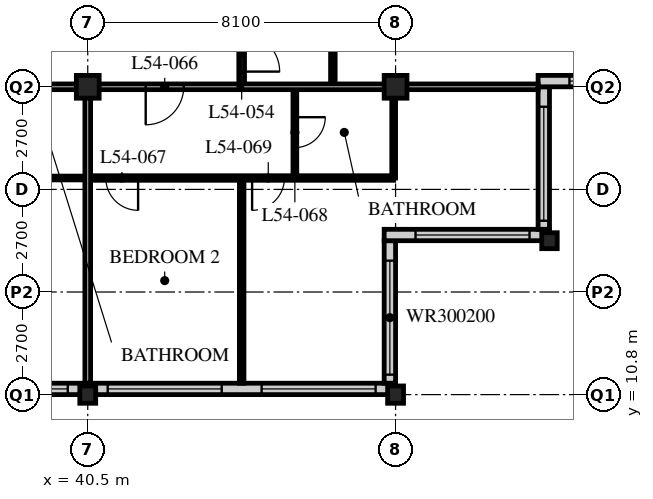
"""IFC4 building model, lengths in metres.
Left out: names, types, materials, properties, quantities, classifications, styles, units other than length and angle.
Written with IfcOpenShell. Run it as: python <this file> out.ifc"""

import sys

from ifc_helpers import new_model, si_unit, direction, frame, frame_2d, origin, origin_2d, place, context, subcontext, project, spatial, rectangle, hollow_rectangle, i_section, extrude, element, fill, save


model = new_model("IFC4")
c1 = context("Model", 3, precision=1e-05, world=origin(), true_north=direction((0.0, 1.0)))
c2 = subcontext(c1, "Body", "Model", "MODEL_VIEW")
j1 = project(units=[si_unit("LENGTHUNIT", "METRE"), si_unit("PLANEANGLEUNIT", "RADIAN")], contexts=[c1])
p1 = place(None, origin())
s1 = spatial("IfcSite", under=j1, at=p1, CompositionType="ELEMENT")
p2 = place(p1, origin())
s2 = spatial("IfcBuilding", under=s1, at=p2, CompositionType="ELEMENT")
p3 = place(p2, frame((0.0, 0.0, 210.0)))
s3 = spatial("IfcBuildingStorey", under=s2, at=p3, CompositionType="ELEMENT", Elevation=210.0)
p4 = place(p3, frame((40.5, 10.8, 0.0), z_axis=(0.0, 0.0, 1.0), x_axis=(1.0, 0.0, 0.0)))
e1 = element("IfcColumn", 1, at=p4, inside=s3, PredefinedType="COLUMN", context=c2, shape_type="SweptSolid", body=[
    extrude(i_section(OverallWidth=0.418, OverallDepth=0.456, WebThickness=0.042, FlangeThickness=0.067, FilletRadius=0.015, at=origin_2d()), origin(), (0.0, 0.0, 1.0), 3.6),
])
p5 = place(p3, frame((40.5, 18.9, 0.0), z_axis=(0.0, 0.0, 1.0), x_axis=(1.0, 0.0, 0.0)))
e2 = element("IfcColumn", 2, at=p5, inside=s3, PredefinedType="COLUMN", context=c2, shape_type="SweptSolid", body=[
    extrude(hollow_rectangle(XDim=0.6, YDim=0.6, WallThickness=0.05, at=origin_2d()), origin(), (0.0, 0.0, 1.0), 3.6),
])
p6 = place(p3, frame((48.6, 10.8, 0.0), z_axis=(0.0, 0.0, 1.0), x_axis=(1.0, 0.0, 0.0)))
e3 = element("IfcColumn", 3, at=p6, inside=s3, PredefinedType="COLUMN", context=c2, shape_type="SweptSolid", body=[
    extrude(i_section(OverallWidth=0.418, OverallDepth=0.456, WebThickness=0.042, FlangeThickness=0.067, FilletRadius=0.015, at=origin_2d()), origin(), (0.0, 0.0, 1.0), 3.6),
])
p7 = place(p3, frame((48.6, 18.9, 0.0), z_axis=(0.0, 0.0, 1.0), x_axis=(1.0, 0.0, 0.0)))
e4 = element("IfcColumn", 4, at=p7, inside=s3, PredefinedType="COLUMN", context=c2, shape_type="SweptSolid", body=[
    extrude(hollow_rectangle(XDim=0.6, YDim=0.6, WallThickness=0.05, at=origin_2d()), origin(), (0.0, 0.0, 1.0), 3.6),
])
p8 = place(p3, frame((52.65, 14.85, 0.0), z_axis=(0.0, 0.0, 1.0), x_axis=(1.0, 0.0, 0.0)))
e5 = element("IfcColumn", 5, at=p8, inside=s3, PredefinedType="COLUMN", context=c2, shape_type="SweptSolid", body=[
    extrude(i_section(OverallWidth=0.407, OverallDepth=0.419, WebThickness=0.031, FlangeThickness=0.049, FilletRadius=0.015, at=origin_2d()), origin(), (0.0, 0.0, 1.0), 3.6),
])
p9 = place(p3, frame((8.4, 10.95, 0.0), z_axis=(0.0, 0.0, 1.0), x_axis=(1.0, 0.0, 0.0)))
e6 = element("IfcWall", 6, at=p9, inside=s3, PredefinedType="SOLIDWALL", context=c2, shape_type="SweptSolid", body=[
    extrude(rectangle(XDim=40.2, YDim=0.3, at=frame_2d((20.1, 0.0))), origin(), (0.0, 0.0, 1.0), 3.39),
])
p10 = place(p9, frame((0.225, 0.0, 0.6)))
e7 = element("IfcOpeningElement", 7, at=p10, cuts=e6, PredefinedType="OPENING", context=c2, shape_type="SweptSolid", body=[
    extrude(rectangle(XDim=3.0, YDim=2.4, at=frame_2d((1.5, 1.2))), frame((0.0, 0.16, 0.0), z_axis=(0.0, -1.0, 0.0), x_axis=(1.0, 0.0, 0.0)), (0.0, 0.0, 1.0), 0.32),
])
p11 = place(p9, frame((4.275, 0.0, 0.6)))
e8 = element("IfcOpeningElement", 8, at=p11, cuts=e6, PredefinedType="OPENING", context=c2, shape_type="SweptSolid", body=[
    extrude(rectangle(XDim=3.0, YDim=2.4, at=frame_2d((1.5, 1.2))), frame((0.0, 0.16, 0.0), z_axis=(0.0, -1.0, 0.0), x_axis=(1.0, 0.0, 0.0)), (0.0, 0.0, 1.0), 0.32),
])
p12 = place(p9, frame((8.325, 0.0, 0.6)))
e9 = element("IfcOpeningElement", 9, at=p12, cuts=e6, PredefinedType="OPENING", context=c2, shape_type="SweptSolid", body=[
    extrude(rectangle(XDim=3.0, YDim=2.4, at=frame_2d((1.5, 1.2))), frame((0.0, 0.16, 0.0), z_axis=(0.0, -1.0, 0.0), x_axis=(1.0, 0.0, 0.0)), (0.0, 0.0, 1.0), 0.32),
])
p13 = place(p9, frame((12.375, 0.0, 0.6)))
e10 = element("IfcOpeningElement", 10, at=p13, cuts=e6, PredefinedType="OPENING", context=c2, shape_type="SweptSolid", body=[
    extrude(rectangle(XDim=3.0, YDim=2.4, at=frame_2d((1.5, 1.2))), frame((0.0, 0.16, 0.0), z_axis=(0.0, -1.0, 0.0), x_axis=(1.0, 0.0, 0.0)), (0.0, 0.0, 1.0), 0.32),
])
p14 = place(p9, frame((16.425, 0.0, 0.6)))
e11 = element("IfcOpeningElement", 11, at=p14, cuts=e6, PredefinedType="OPENING", context=c2, shape_type="SweptSolid", body=[
    extrude(rectangle(XDim=3.0, YDim=2.4, at=frame_2d((1.5, 1.2))), frame((0.0, 0.16, 0.0), z_axis=(0.0, -1.0, 0.0), x_axis=(1.0, 0.0, 0.0)), (0.0, 0.0, 1.0), 0.32),
])
p15 = place(p9, frame((20.475, 0.0, 0.6)))
e12 = element("IfcOpeningElement", 12, at=p15, cuts=e6, PredefinedType="OPENING", context=c2, shape_type="SweptSolid", body=[
    extrude(rectangle(XDim=3.0, YDim=2.4, at=frame_2d((1.5, 1.2))), frame((0.0, 0.16, 0.0), z_axis=(0.0, -1.0, 0.0), x_axis=(1.0, 0.0, 0.0)), (0.0, 0.0, 1.0), 0.32),
])
p16 = place(p9, frame((24.525, 0.0, 0.6)))
e13 = element("IfcOpeningElement", 13, at=p16, cuts=e6, PredefinedType="OPENING", context=c2, shape_type="SweptSolid", body=[
    extrude(rectangle(XDim=3.0, YDim=2.4, at=frame_2d((1.5, 1.2))), frame((0.0, 0.16, 0.0), z_axis=(0.0, -1.0, 0.0), x_axis=(1.0, 0.0, 0.0)), (0.0, 0.0, 1.0), 0.32),
])
p17 = place(p9, frame((28.575, 0.0, 0.6)))
e14 = element("IfcOpeningElement", 14, at=p17, cuts=e6, PredefinedType="OPENING", context=c2, shape_type="SweptSolid", body=[
    extrude(rectangle(XDim=3.0, YDim=2.4, at=frame_2d((1.5, 1.2))), frame((0.0, 0.16, 0.0), z_axis=(0.0, -1.0, 0.0), x_axis=(1.0, 0.0, 0.0)), (0.0, 0.0, 1.0), 0.32),
])
p18 = place(p9, frame((32.625, 0.0, 0.6)))
e15 = element("IfcOpeningElement", 15, at=p18, cuts=e6, PredefinedType="OPENING", context=c2, shape_type="SweptSolid", body=[
    extrude(rectangle(XDim=3.0, YDim=2.4, at=frame_2d((1.5, 1.2))), frame((0.0, 0.16, 0.0), z_axis=(0.0, -1.0, 0.0), x_axis=(1.0, 0.0, 0.0)), (0.0, 0.0, 1.0), 0.32),
])
p19 = place(p9, frame((36.675, 0.0, 0.6)))
e16 = element("IfcOpeningElement", 16, at=p19, cuts=e6, PredefinedType="OPENING", context=c2, shape_type="SweptSolid", body=[
    extrude(rectangle(XDim=3.0, YDim=2.4, at=frame_2d((1.5, 1.2))), frame((0.0, 0.16, 0.0), z_axis=(0.0, -1.0, 0.0), x_axis=(1.0, 0.0, 0.0)), (0.0, 0.0, 1.0), 0.32),
])
p20 = place(p3, frame((48.45, 11.1, 0.0), z_axis=(0.0, 0.0, 1.0), x_axis=(0.0, 1.0, 0.0)))
e17 = element("IfcWall", 17, at=p20, inside=s3, PredefinedType="SOLIDWALL", context=c2, shape_type="SweptSolid", body=[
    extrude(rectangle(XDim=3.75, YDim=0.3, at=frame_2d((1.875, 0.0))), origin(), (0.0, 0.0, 1.0), 3.39),
])
p21 = place(p20, frame((0.225, 0.0, 0.6)))
e18 = element("IfcOpeningElement", 18, at=p21, cuts=e17, PredefinedType="OPENING", context=c2, shape_type="SweptSolid", body=[
    extrude(rectangle(XDim=3.0, YDim=2.0, at=frame_2d((1.5, 1.0))), frame((0.0, 0.16, 0.0), z_axis=(0.0, -1.0, 0.0), x_axis=(1.0, 0.0, 0.0)), (0.0, 0.0, 1.0), 0.32),
])
p22 = place(p3, frame((48.3, 15.0, 0.0), z_axis=(0.0, 0.0, 1.0), x_axis=(1.0, 0.0, 0.0)))
e19 = element("IfcWall", 19, at=p22, inside=s3, PredefinedType="SOLIDWALL", context=c2, shape_type="SweptSolid", body=[
    extrude(rectangle(XDim=4.35, YDim=0.3, at=frame_2d((2.175, 0.0))), origin(), (0.0, 0.0, 1.0), 3.39),
])
p23 = place(p22, frame((0.825, 0.0, 0.6)))
e20 = element("IfcOpeningElement", 20, at=p23, cuts=e19, PredefinedType="OPENING", context=c2, shape_type="SweptSolid", body=[
    extrude(rectangle(XDim=3.0, YDim=2.0, at=frame_2d((1.5, 1.0))), frame((0.0, 0.16, 0.0), z_axis=(0.0, -1.0, 0.0), x_axis=(1.0, 0.0, 0.0)), (0.0, 0.0, 1.0), 0.32),
])
p24 = place(p3, frame((52.5, 15.15, 0.0), z_axis=(0.0, 0.0, 1.0), x_axis=(0.0, 1.0, 0.0)))
e21 = element("IfcWall", 21, at=p24, inside=s3, PredefinedType="SOLIDWALL", context=c2, shape_type="SweptSolid", body=[
    extrude(rectangle(XDim=3.75, YDim=0.3, at=frame_2d((1.875, 0.0))), origin(), (0.0, 0.0, 1.0), 3.39),
])
p25 = place(p24, frame((0.225, 0.0, 0.6)))
e22 = element("IfcOpeningElement", 22, at=p25, cuts=e21, PredefinedType="OPENING", context=c2, shape_type="SweptSolid", body=[
    extrude(rectangle(XDim=3.0, YDim=2.0, at=frame_2d((1.5, 1.0))), frame((0.0, 0.16, 0.0), z_axis=(0.0, -1.0, 0.0), x_axis=(1.0, 0.0, 0.0)), (0.0, 0.0, 1.0), 0.32),
])
p26 = place(p3, frame((52.35, 19.05, 0.0), z_axis=(0.0, 0.0, 1.0), x_axis=(1.0, 0.0, 0.0)))
e23 = element("IfcWall", 23, at=p26, inside=s3, PredefinedType="SOLIDWALL", context=c2, shape_type="SweptSolid", body=[
    extrude(rectangle(XDim=4.35, YDim=0.3, at=frame_2d((2.175, 0.0))), origin(), (0.0, 0.0, 1.0), 3.39),
])
p27 = place(p26, frame((0.825, 0.0, 0.6)))
e24 = element("IfcOpeningElement", 24, at=p27, cuts=e23, PredefinedType="OPENING", context=c2, shape_type="SweptSolid", body=[
    extrude(rectangle(XDim=3.0, YDim=2.0, at=frame_2d((1.5, 1.0))), frame((0.0, 0.16, 0.0), z_axis=(0.0, -1.0, 0.0), x_axis=(1.0, 0.0, 0.0)), (0.0, 0.0, 1.0), 0.32),
])
p28 = place(p3, frame((8.1, 18.9, 0.0), z_axis=(0.0, 0.0, 1.0), x_axis=(1.0, 0.0, 0.0)))
e25 = element("IfcWall", 25, at=p28, inside=s3, PredefinedType="PARTITIONING", context=c2, shape_type="SweptSolid", body=[
    extrude(rectangle(XDim=36.45, YDim=0.15, at=frame_2d((18.225, 0.0))), origin(), (0.0, 0.0, 1.0), 2.778),
])
p29 = place(p28, frame((4.45, 0.0, 0.0)))
e26 = element("IfcOpeningElement", 26, at=p29, cuts=e25, PredefinedType="OPENING", context=c2, shape_type="SweptSolid", body=[
    extrude(rectangle(XDim=1.0, YDim=2.1, at=frame_2d((0.5, 1.05))), frame((0.0, 0.085, 0.0), z_axis=(0.0, -1.0, 0.0), x_axis=(1.0, 0.0, 0.0)), (0.0, 0.0, 1.0), 0.17),
])
p30 = place(p28, frame((12.55, 0.0, 0.0)))
e27 = element("IfcOpeningElement", 27, at=p30, cuts=e25, PredefinedType="OPENING", context=c2, shape_type="SweptSolid", body=[
    extrude(rectangle(XDim=1.0, YDim=2.1, at=frame_2d((0.5, 1.05))), frame((0.0, 0.085, 0.0), z_axis=(0.0, -1.0, 0.0), x_axis=(1.0, 0.0, 0.0)), (0.0, 0.0, 1.0), 0.17),
])
p31 = place(p28, frame((29.05, 0.0, 0.0)))
e28 = element("IfcOpeningElement", 28, at=p31, cuts=e25, PredefinedType="OPENING", context=c2, shape_type="SweptSolid", body=[
    extrude(rectangle(XDim=1.0, YDim=2.1, at=frame_2d((0.5, 1.05))), frame((0.0, 0.085, 0.0), z_axis=(0.0, -1.0, 0.0), x_axis=(1.0, 0.0, 0.0)), (0.0, 0.0, 1.0), 0.17),
])
p32 = place(p28, frame((2.625, 0.0, 0.0)))
e29 = element("IfcOpeningElement", 29, at=p32, cuts=e25, PredefinedType="OPENING", context=c2, shape_type="SweptSolid", body=[
    extrude(rectangle(XDim=1.0, YDim=2.1, at=frame_2d((0.5, 1.05))), frame((0.0, 0.085, 0.0), z_axis=(0.0, -1.0, 0.0), x_axis=(1.0, 0.0, 0.0)), (0.0, 0.0, 1.0), 0.17),
])
p33 = place(p28, frame((33.925, 0.0, 0.0)))
e30 = element("IfcOpeningElement", 30, at=p33, cuts=e25, PredefinedType="OPENING", context=c2, shape_type="SweptSolid", body=[
    extrude(rectangle(XDim=1.0, YDim=2.1, at=frame_2d((0.5, 1.05))), frame((0.0, 0.085, 0.0), z_axis=(0.0, -1.0, 0.0), x_axis=(1.0, 0.0, 0.0)), (0.0, 0.0, 1.0), 0.17),
])
p34 = place(p3, frame((44.55, 18.9, 0.0), z_axis=(0.0, 0.0, 1.0), x_axis=(0.0, 1.0, 0.0)))
e31 = element("IfcWall", 31, at=p34, inside=s3, PredefinedType="PARTITIONING", context=c2, shape_type="SweptSolid", body=[
    extrude(rectangle(XDim=28.35, YDim=0.15, at=frame_2d((14.175, 0.0))), origin(), (0.0, 0.0, 1.0), 3.39),
])
p35 = place(p34, frame((0.4, 0.0, 0.0)))
e32 = element("IfcOpeningElement", 32, at=p35, cuts=e31, PredefinedType="OPENING", context=c2, shape_type="SweptSolid", body=[
    extrude(rectangle(XDim=1.0, YDim=2.1, at=frame_2d((0.5, 1.05))), frame((0.0, 0.085, 0.0), z_axis=(0.0, -1.0, 0.0), x_axis=(1.0, 0.0, 0.0)), (0.0, 0.0, 1.0), 0.17),
])
p36 = place(p34, frame((12.55, 0.0, 0.0)))
e33 = element("IfcOpeningElement", 33, at=p36, cuts=e31, PredefinedType="OPENING", context=c2, shape_type="SweptSolid", body=[
    extrude(rectangle(XDim=1.0, YDim=2.1, at=frame_2d((0.5, 1.05))), frame((0.0, 0.085, 0.0), z_axis=(0.0, -1.0, 0.0), x_axis=(1.0, 0.0, 0.0)), (0.0, 0.0, 1.0), 0.17),
])
p37 = place(p34, frame((26.65, 0.0, 0.0)))
e34 = element("IfcOpeningElement", 34, at=p37, cuts=e31, PredefinedType="OPENING", context=c2, shape_type="SweptSolid", body=[
    extrude(rectangle(XDim=1.0, YDim=2.1, at=frame_2d((0.5, 1.05))), frame((0.0, 0.085, 0.0), z_axis=(0.0, -1.0, 0.0), x_axis=(1.0, 0.0, 0.0)), (0.0, 0.0, 1.0), 0.17),
])
p38 = place(p3, frame((38.3, 16.5, 0.0), z_axis=(0.0, 0.0, 1.0), x_axis=(1.0, 0.0, 0.0)))
e35 = element("IfcWall", 35, at=p38, inside=s3, PredefinedType="PARTITIONING", context=c2, shape_type="SweptSolid", body=[
    extrude(rectangle(XDim=2.2, YDim=0.1, at=frame_2d((1.1, 0.0))), origin(), (0.0, 0.0, 1.0), 3.39),
])
p39 = place(p3, frame((46.95, 18.9, 0.0), z_axis=(0.0, 0.0, 1.0), x_axis=(0.0, 1.0, 0.0)))
e36 = element("IfcWall", 36, at=p39, inside=s3, PredefinedType="PARTITIONING", context=c2, shape_type="SweptSolid", body=[
    extrude(rectangle(XDim=24.3, YDim=0.12, at=frame_2d((12.15, 0.0))), origin(), (0.0, 0.0, 1.0), 3.39),
])
p40 = place(p39, frame((0.975, 0.0, 0.0)))
e37 = element("IfcOpeningElement", 37, at=p40, cuts=e36, PredefinedType="OPENING", context=c2, shape_type="SweptSolid", body=[
    extrude(rectangle(XDim=0.85, YDim=2.1, at=frame_2d((0.425, 1.05))), frame((0.0, 0.07, 0.0), z_axis=(0.0, -1.0, 0.0), x_axis=(1.0, 0.0, 0.0)), (0.0, 0.0, 1.0), 0.14),
])
p41 = place(p39, frame((8.425, 0.0, 0.0)))
e38 = element("IfcOpeningElement", 38, at=p41, cuts=e36, PredefinedType="OPENING", context=c2, shape_type="SweptSolid", body=[
    extrude(rectangle(XDim=0.85, YDim=2.1, at=frame_2d((0.425, 1.05))), frame((0.0, 0.07, 0.0), z_axis=(0.0, -1.0, 0.0), x_axis=(1.0, 0.0, 0.0)), (0.0, 0.0, 1.0), 0.14),
])
p42 = place(p39, frame((13.125, 0.0, 0.0)))
e39 = element("IfcOpeningElement", 39, at=p42, cuts=e36, PredefinedType="OPENING", context=c2, shape_type="SweptSolid", body=[
    extrude(rectangle(XDim=0.85, YDim=2.1, at=frame_2d((0.425, 1.05))), frame((0.0, 0.07, 0.0), z_axis=(0.0, -1.0, 0.0), x_axis=(1.0, 0.0, 0.0)), (0.0, 0.0, 1.0), 0.14),
])
p43 = place(p39, frame((20.575, 0.0, 0.0)))
e40 = element("IfcOpeningElement", 40, at=p43, cuts=e36, PredefinedType="OPENING", context=c2, shape_type="SweptSolid", body=[
    extrude(rectangle(XDim=0.85, YDim=2.1, at=frame_2d((0.425, 1.05))), frame((0.0, 0.07, 0.0), z_axis=(0.0, -1.0, 0.0), x_axis=(1.0, 0.0, 0.0)), (0.0, 0.0, 1.0), 0.14),
])
p44 = place(p3, frame((40.5, 16.5, 0.0), z_axis=(0.0, 0.0, 1.0), x_axis=(1.0, 0.0, 0.0)))
e41 = element("IfcWall", 41, at=p44, inside=s3, PredefinedType="PARTITIONING", context=c2, shape_type="SweptSolid", body=[
    extrude(rectangle(XDim=8.05, YDim=0.12, at=frame_2d((4.025, 0.0))), origin(), (0.0, 0.0, 1.0), 3.39),
])
p45 = place(p44, frame((0.475, 0.0, 0.0)))
e42 = element("IfcOpeningElement", 42, at=p45, cuts=e41, PredefinedType="OPENING", context=c2, shape_type="SweptSolid", body=[
    extrude(rectangle(XDim=0.85, YDim=2.1, at=frame_2d((0.425, 1.05))), frame((0.0, 0.07, 0.0), z_axis=(0.0, -1.0, 0.0), x_axis=(1.0, 0.0, 0.0)), (0.0, 0.0, 1.0), 0.14),
])
p46 = place(p44, frame((4.325, 0.0, 0.0)))
e43 = element("IfcOpeningElement", 43, at=p46, cuts=e41, PredefinedType="OPENING", context=c2, shape_type="SweptSolid", body=[
    extrude(rectangle(XDim=0.85, YDim=2.1, at=frame_2d((0.425, 1.05))), frame((0.0, 0.07, 0.0), z_axis=(0.0, -1.0, 0.0), x_axis=(1.0, 0.0, 0.0)), (0.0, 0.0, 1.0), 0.14),
])
p47 = place(p3, frame((45.95, 18.9, 0.0), z_axis=(0.0, 0.0, 1.0), x_axis=(0.0, -1.0, 0.0)))
e44 = element("IfcWall", 44, at=p47, inside=s3, PredefinedType="PARTITIONING", context=c2, shape_type="SweptSolid", body=[
    extrude(rectangle(XDim=2.4, YDim=0.1, at=frame_2d((1.2, 0.0))), origin(), (0.0, 0.0, 1.0), 3.39),
])
p48 = place(p47, frame((0.8, 0.0, 0.0)))
e45 = element("IfcOpeningElement", 45, at=p48, cuts=e44, PredefinedType="OPENING", context=c2, shape_type="SweptSolid", body=[
    extrude(rectangle(XDim=0.8, YDim=2.1, at=frame_2d((0.4, 1.05))), frame((0.0, 0.06, 0.0), z_axis=(0.0, -1.0, 0.0), x_axis=(1.0, 0.0, 0.0)), (0.0, 0.0, 1.0), 0.12),
])
p49 = place(p3, frame((48.55, 18.9, 0.0), z_axis=(0.0, 0.0, 1.0), x_axis=(0.0, -1.0, 0.0)))
e46 = element("IfcWall", 46, at=p49, inside=s3, PredefinedType="PARTITIONING", context=c2, shape_type="SweptSolid", body=[
    extrude(rectangle(XDim=2.4, YDim=0.1, at=frame_2d((1.2, 0.0))), origin(), (0.0, 0.0, 1.0), 2.778),
])
p50 = place(p3, frame((44.55, 16.5, 0.0), z_axis=(0.0, 0.0, 1.0), x_axis=(0.0, -1.0, 0.0)))
e47 = element("IfcWall", 47, at=p50, inside=s3, PredefinedType="PARTITIONING", context=c2, shape_type="SweptSolid", body=[
    extrude(rectangle(XDim=5.4, YDim=0.12, at=frame_2d((2.7, 0.0))), origin(), (0.0, 0.0, 1.0), 3.39),
])
p51 = place(p3, frame((44.55, 18.9, 0.0), z_axis=(0.0, 0.0, 1.0), x_axis=(1.0, 0.0, 0.0)))
e48 = element("IfcWall", 48, at=p51, inside=s3, PredefinedType="PARTITIONING", context=c2, shape_type="SweptSolid", body=[
    extrude(rectangle(XDim=7.8, YDim=0.15, at=frame_2d((3.9, 0.0))), origin(), (0.0, 0.0, 1.0), 2.778),
])
p52 = place(p3, frame((40.5, 18.9, 0.0), z_axis=(0.0, 0.0, 1.0), x_axis=(0.0, -1.0, 0.0)))
e49 = element("IfcWall", 49, at=p52, inside=s3, PredefinedType="PARTITIONING", context=c2, shape_type="SweptSolid", body=[
    extrude(rectangle(XDim=7.8, YDim=0.15, at=frame_2d((3.9, 0.0))), origin(), (0.0, 0.0, 1.0), 2.778),
])
p53 = place(p17, origin())
e50 = element("IfcWindow", 50, at=p53, inside=s3, PartitioningType="SINGLE_PANEL", PredefinedType="WINDOW", context=c2, shape_type="SweptSolid", body=[
    extrude(rectangle(XDim=3.0, YDim=2.4, at=frame_2d((1.5, 1.2))), frame((0.0, 0.03, 0.0), z_axis=(0.0, -1.0, 0.0), x_axis=(1.0, 0.0, 0.0)), (0.0, 0.0, 1.0), 0.06),
])
fill(e14, e50)
p54 = place(p18, origin())
e51 = element("IfcWindow", 51, at=p54, inside=s3, PartitioningType="SINGLE_PANEL", PredefinedType="WINDOW", context=c2, shape_type="SweptSolid", body=[
    extrude(rectangle(XDim=3.0, YDim=2.4, at=frame_2d((1.5, 1.2))), frame((0.0, 0.03, 0.0), z_axis=(0.0, -1.0, 0.0), x_axis=(1.0, 0.0, 0.0)), (0.0, 0.0, 1.0), 0.06),
])
fill(e15, e51)
p55 = place(p19, origin())
e52 = element("IfcWindow", 52, at=p55, inside=s3, PartitioningType="SINGLE_PANEL", PredefinedType="WINDOW", context=c2, shape_type="SweptSolid", body=[
    extrude(rectangle(XDim=3.0, YDim=2.4, at=frame_2d((1.5, 1.2))), frame((0.0, 0.03, 0.0), z_axis=(0.0, -1.0, 0.0), x_axis=(1.0, 0.0, 0.0)), (0.0, 0.0, 1.0), 0.06),
])
fill(e16, e52)
p56 = place(p21, origin())
e53 = element("IfcWindow", 53, at=p56, inside=s3, PartitioningType="SINGLE_PANEL", PredefinedType="WINDOW", context=c2, shape_type="SweptSolid", body=[
    extrude(rectangle(XDim=3.0, YDim=2.0, at=frame_2d((1.5, 1.0))), frame((0.0, 0.03, 0.0), z_axis=(0.0, -1.0, 0.0), x_axis=(1.0, 0.0, 0.0)), (0.0, 0.0, 1.0), 0.06),
])
fill(e18, e53)
p57 = place(p23, origin())
e54 = element("IfcWindow", 54, at=p57, inside=s3, PartitioningType="SINGLE_PANEL", PredefinedType="WINDOW", context=c2, shape_type="SweptSolid", body=[
    extrude(rectangle(XDim=3.0, YDim=2.0, at=frame_2d((1.5, 1.0))), frame((0.0, 0.03, 0.0), z_axis=(0.0, -1.0, 0.0), x_axis=(1.0, 0.0, 0.0)), (0.0, 0.0, 1.0), 0.06),
])
fill(e20, e54)
p58 = place(p25, origin())
e55 = element("IfcWindow", 55, at=p58, inside=s3, PartitioningType="SINGLE_PANEL", PredefinedType="WINDOW", context=c2, shape_type="SweptSolid", body=[
    extrude(rectangle(XDim=3.0, YDim=2.0, at=frame_2d((1.5, 1.0))), frame((0.0, 0.03, 0.0), z_axis=(0.0, -1.0, 0.0), x_axis=(1.0, 0.0, 0.0)), (0.0, 0.0, 1.0), 0.06),
])
fill(e22, e55)
p59 = place(p27, origin())
e56 = element("IfcWindow", 56, at=p59, inside=s3, PartitioningType="SINGLE_PANEL", PredefinedType="WINDOW", context=c2, shape_type="SweptSolid", body=[
    extrude(rectangle(XDim=3.0, YDim=2.0, at=frame_2d((1.5, 1.0))), frame((0.0, 0.03, 0.0), z_axis=(0.0, -1.0, 0.0), x_axis=(1.0, 0.0, 0.0)), (0.0, 0.0, 1.0), 0.06),
])
fill(e24, e56)
p60 = place(p35, origin())
e57 = element("IfcDoor", 57, at=p60, inside=s3, OperationType="SINGLE_SWING_RIGHT", PredefinedType="DOOR", context=c2, shape_type="SweptSolid", body=[
    extrude(rectangle(XDim=1.0, YDim=2.1, at=frame_2d((0.5, 1.05))), frame((0.0, 0.025, 0.0), z_axis=(0.0, -1.0, 0.0), x_axis=(1.0, 0.0, 0.0)), (0.0, 0.0, 1.0), 0.05),
])
fill(e32, e57)
p61 = place(p33, origin())
e58 = element("IfcDoor", 58, at=p61, inside=s3, OperationType="SINGLE_SWING_RIGHT", PredefinedType="DOOR", context=c2, shape_type="SweptSolid", body=[
    extrude(rectangle(XDim=1.0, YDim=2.1, at=frame_2d((0.5, 1.05))), frame((0.0, 0.025, 0.0), z_axis=(0.0, -1.0, 0.0), x_axis=(1.0, 0.0, 0.0)), (0.0, 0.0, 1.0), 0.05),
])
fill(e30, e58)
p62 = place(p45, origin())
e59 = element("IfcDoor", 59, at=p62, inside=s3, OperationType="SINGLE_SWING_LEFT", PredefinedType="DOOR", context=c2, shape_type="SweptSolid", body=[
    extrude(rectangle(XDim=0.85, YDim=2.1, at=frame_2d((0.425, 1.05))), frame((0.0, 0.025, 0.0), z_axis=(0.0, -1.0, 0.0), x_axis=(1.0, 0.0, 0.0)), (0.0, 0.0, 1.0), 0.05),
])
fill(e42, e59)
p63 = place(p48, origin())
e60 = element("IfcDoor", 60, at=p63, inside=s3, OperationType="SINGLE_SWING_LEFT", PredefinedType="DOOR", context=c2, shape_type="SweptSolid", body=[
    extrude(rectangle(XDim=0.8, YDim=2.1, at=frame_2d((0.4, 1.05))), frame((0.0, 0.025, 0.0), z_axis=(0.0, -1.0, 0.0), x_axis=(1.0, 0.0, 0.0)), (0.0, 0.0, 1.0), 0.05),
])
fill(e45, e60)
p64 = place(p46, origin())
e61 = element("IfcDoor", 61, at=p64, inside=s3, OperationType="SINGLE_SWING_RIGHT", PredefinedType="DOOR", context=c2, shape_type="SweptSolid", body=[
    extrude(rectangle(XDim=0.85, YDim=2.1, at=frame_2d((0.425, 1.05))), frame((0.0, 0.025, 0.0), z_axis=(0.0, -1.0, 0.0), x_axis=(1.0, 0.0, 0.0)), (0.0, 0.0, 1.0), 0.05),
])
fill(e43, e61)
save(model, sys.argv[1])
